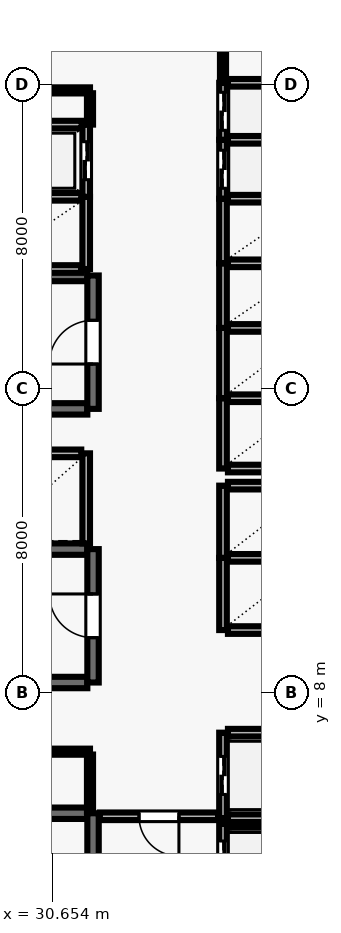
"""IFC4 building model, lengths in metres.
Left out: names, types, materials, properties, quantities, classifications, styles, units other than length and angle.
Written with IfcOpenShell. Run it as: python <this file> out.ifc"""

import sys

from ifc_helpers import new_model, si_unit, direction, frame, frame_2d, origin, place, context, subcontext, project, spatial, rectangle, extrude, element, fill, save


model = new_model("IFC4")
c1 = context("Model", 3, precision=1e-05, world=origin(), true_north=direction((0.0, 1.0)))
c2 = subcontext(c1, "Body", "Model", "MODEL_VIEW")
j1 = project(units=[si_unit("LENGTHUNIT", "METRE"), si_unit("PLANEANGLEUNIT", "RADIAN")], contexts=[c1])
p1 = place(None, origin())
s1 = spatial("IfcSite", under=j1, at=p1, CompositionType="ELEMENT")
p2 = place(p1, origin())
s2 = spatial("IfcBuilding", under=s1, at=p2, CompositionType="ELEMENT")
p3 = place(p2, frame((0.0, 0.0, 34.9)))
s3 = spatial("IfcBuildingStorey", under=s2, at=p3, CompositionType="ELEMENT", Elevation=34.9)
p4 = place(p3, frame((31.58, 4.83, 0.0), z_axis=(0.0, 0.0, 1.0), x_axis=(-1.0, 0.0, 0.0)))
e1 = element("IfcWall", 1, at=p4, inside=s3, PredefinedType="SHEAR", context=c2, shape_type="SweptSolid", body=[
    extrude(rectangle(XDim=8.36, YDim=0.3, at=frame_2d((4.18, 0.0))), origin(), (0.0, 0.0, 1.0), 3.69),
])
p5 = place(p3, frame((31.73, 0.96, 0.0), z_axis=(0.0, 0.0, 1.0), x_axis=(0.0, 1.0, 0.0)))
e2 = element("IfcWall", 2, at=p5, inside=s3, PredefinedType="SHEAR", context=c2, shape_type="SweptSolid", body=[
    extrude(rectangle(XDim=3.87, YDim=0.3, at=frame_2d((1.935, 0.0))), origin(), (0.0, 0.0, 1.0), 3.69),
])
p6 = place(p5, frame((1.54, 0.0, 0.0)))
e3 = element("IfcOpeningElement", 3, at=p6, cuts=e2, PredefinedType="OPENING", context=c2, shape_type="SweptSolid", body=[
    extrude(rectangle(XDim=1.15, YDim=2.15, at=frame_2d((0.575, 1.075))), frame((0.0, 0.16, 0.0), z_axis=(0.0, -1.0, 0.0), x_axis=(1.0, 0.0, 0.0)), (0.0, 0.0, 1.0), 0.32),
])
for number, where, z_axis, x_axis in (
    (4, (31.58, 18.98, 0.0), (0.0, 0.0, 1.0), (-1.0, 0.0, 0.0)),
    (5, (23.22, 15.47, 0.0), (0.0, 0.0, 1.0), (1.0, 0.0, 0.0)),
):
    element("IfcWall", number, at=place(p3, frame(where, z_axis=z_axis, x_axis=x_axis)), inside=s3, PredefinedType="SHEAR", context=c2, shape_type="SweptSolid", body=[
        extrude(rectangle(XDim=8.36, YDim=0.3, at=frame_2d((4.18, 0.0))), origin(), (0.0, 0.0, 1.0), 3.69),
    ])
p7 = place(p3, frame((31.73, 15.47, 0.0), z_axis=(0.0, 0.0, 1.0), x_axis=(0.0, 1.0, 0.0)))
e6 = element("IfcWall", 6, at=p7, inside=s3, PredefinedType="SHEAR", context=c2, shape_type="SweptSolid", body=[
    extrude(rectangle(XDim=3.51, YDim=0.3, at=frame_2d((1.755, 0.0))), origin(), (0.0, 0.0, 1.0), 3.69),
])
p8 = place(p7, frame((1.18, 0.0, 0.0)))
e7 = element("IfcOpeningElement", 7, at=p8, cuts=e6, PredefinedType="OPENING", context=c2, shape_type="SweptSolid", body=[
    extrude(rectangle(XDim=1.15, YDim=2.15, at=frame_2d((0.575, 1.075))), frame((0.0, 0.16, 0.0), z_axis=(0.0, -1.0, 0.0), x_axis=(1.0, 0.0, 0.0)), (0.0, 0.0, 1.0), 0.32),
])
for number, where, z_axis, x_axis in (
    (8, (31.58, 11.78, 0.0), (0.0, 0.0, 1.0), (-1.0, 0.0, 0.0)),
    (9, (23.22, 8.27, 0.0), (0.0, 0.0, 1.0), (1.0, 0.0, 0.0)),
):
    element("IfcWall", number, at=place(p3, frame(where, z_axis=z_axis, x_axis=x_axis)), inside=s3, PredefinedType="SHEAR", context=c2, shape_type="SweptSolid", body=[
        extrude(rectangle(XDim=8.36, YDim=0.3, at=frame_2d((4.18, 0.0))), origin(), (0.0, 0.0, 1.0), 3.69),
    ])
p9 = place(p3, frame((31.73, 8.27, 0.0), z_axis=(0.0, 0.0, 1.0), x_axis=(0.0, 1.0, 0.0)))
e10 = element("IfcWall", 10, at=p9, inside=s3, PredefinedType="SHEAR", context=c2, shape_type="SweptSolid", body=[
    extrude(rectangle(XDim=3.51, YDim=0.3, at=frame_2d((1.755, 0.0))), origin(), (0.0, 0.0, 1.0), 3.69),
])
p10 = place(p9, frame((1.18, 0.0, 0.0)))
e11 = element("IfcOpeningElement", 11, at=p10, cuts=e10, PredefinedType="OPENING", context=c2, shape_type="SweptSolid", body=[
    extrude(rectangle(XDim=1.15, YDim=2.15, at=frame_2d((0.575, 1.075))), frame((0.0, 0.16, 0.0), z_axis=(0.0, -1.0, 0.0), x_axis=(1.0, 0.0, 0.0)), (0.0, 0.0, 1.0), 0.32),
])
p11 = place(p3, frame((35.15, 4.55, 0.0), z_axis=(0.0, 0.0, 1.0), x_axis=(0.0, -1.0, 0.0)))
e12 = element("IfcWall", 12, at=p11, inside=s3, PredefinedType="SOLIDWALL", context=c2, shape_type="SweptSolid", body=[
    extrude(rectangle(XDim=2.1, YDim=0.2, at=frame_2d((1.05, 0.0))), origin(), (0.0, 0.0, 1.0), 3.69),
])
p12 = place(p11, frame((0.45, 0.0, 0.0)))
e13 = element("IfcOpeningElement", 13, at=p12, cuts=e12, PredefinedType="OPENING", context=c2, shape_type="SweptSolid", body=[
    extrude(rectangle(XDim=1.2, YDim=2.15, at=frame_2d((0.6, 1.075))), frame((0.0, 0.11, 0.0), z_axis=(0.0, -1.0, 0.0), x_axis=(1.0, 0.0, 0.0)), (0.0, 0.0, 1.0), 0.22),
])
p13 = place(p3, frame((37.42, 4.55, 0.0), z_axis=(0.0, 0.0, 1.0), x_axis=(-1.0, 0.0, 0.0)))
e14 = element("IfcWall", 14, at=p13, inside=s3, PredefinedType="SOLIDWALL", context=c2, shape_type="SweptSolid", body=[
    extrude(rectangle(XDim=2.14, YDim=0.2, at=frame_2d((1.07, 0.0))), origin(), (0.0, 0.0, 1.0), 3.69),
])
p14 = place(p3, frame((35.15, 6.95, 0.0), z_axis=(0.0, 0.0, 1.0), x_axis=(0.0, -1.0, 0.0)))
e15 = element("IfcWall", 15, at=p14, inside=s3, PredefinedType="SOLIDWALL", context=c2, shape_type="SweptSolid", body=[
    extrude(rectangle(XDim=2.25, YDim=0.2, at=frame_2d((1.125, 0.0))), origin(), (0.0, 0.0, 1.0), 3.69),
])
p15 = place(p14, frame((0.625, 0.0, 0.0)))
e16 = element("IfcOpeningElement", 16, at=p15, cuts=e15, PredefinedType="OPENING", context=c2, shape_type="SweptSolid", body=[
    extrude(rectangle(XDim=1.0, YDim=2.1, at=frame_2d((0.5, 1.05))), frame((0.0, 0.11, 0.0), z_axis=(0.0, -1.0, 0.0), x_axis=(1.0, 0.0, 0.0)), (0.0, 0.0, 1.0), 0.22),
])
for number, where, z_axis, x_axis in (
    (17, (35.28, 4.7, 0.0), (0.0, 0.0, 1.0), (1.0, 0.0, 0.0)),
    (18, (37.42, 6.95, 0.0), (0.0, 0.0, 1.0), (-1.0, 0.0, 0.0)),
):
    element("IfcWall", number, at=place(p3, frame(where, z_axis=z_axis, x_axis=x_axis)), inside=s3, PredefinedType="SOLIDWALL", context=c2, shape_type="SweptSolid", body=[
        extrude(rectangle(XDim=2.14, YDim=0.2, at=frame_2d((1.07, 0.0))), origin(), (0.0, 0.0, 1.0), 3.69),
    ])
p16 = place(p3, frame((35.15, 11.55, 0.0), z_axis=(0.0, 0.0, 1.0), x_axis=(0.0, -1.0, 0.0)))
e19 = element("IfcWall", 19, at=p16, inside=s3, PredefinedType="SOLIDWALL", context=c2, shape_type="SweptSolid", body=[
    extrude(rectangle(XDim=1.9, YDim=0.2, at=frame_2d((0.95, 0.0))), origin(), (0.0, 0.0, 1.0), 3.69),
])
for number, where, z_axis, x_axis in (
    (20, (35.28, 9.65, 0.0), (0.0, 0.0, 1.0), (1.0, 0.0, 0.0)),
    (21, (37.42, 11.55, 0.0), (0.0, 0.0, 1.0), (-1.0, 0.0, 0.0)),
):
    element("IfcWall", number, at=place(p3, frame(where, z_axis=z_axis, x_axis=x_axis)), inside=s3, PredefinedType="SOLIDWALL", context=c2, shape_type="SweptSolid", body=[
        extrude(rectangle(XDim=2.14, YDim=0.2, at=frame_2d((1.07, 0.0))), origin(), (0.0, 0.0, 1.0), 3.69),
    ])
p17 = place(p3, frame((35.15, 13.45, 0.0), z_axis=(0.0, 0.0, 1.0), x_axis=(0.0, -1.0, 0.0)))
e22 = element("IfcWall", 22, at=p17, inside=s3, PredefinedType="SOLIDWALL", context=c2, shape_type="SweptSolid", body=[
    extrude(rectangle(XDim=1.9, YDim=0.2, at=frame_2d((0.95, 0.0))), origin(), (0.0, 0.0, 1.0), 3.69),
])
p18 = place(p3, frame((37.42, 13.45, 0.0), z_axis=(0.0, 0.0, 1.0), x_axis=(-1.0, 0.0, 0.0)))
e23 = element("IfcWall", 23, at=p18, inside=s3, PredefinedType="SOLIDWALL", context=c2, shape_type="SweptSolid", body=[
    extrude(rectangle(XDim=2.14, YDim=0.2, at=frame_2d((1.07, 0.0))), origin(), (0.0, 0.0, 1.0), 3.69),
])
p19 = place(p3, frame((31.55, 11.93, 0.0), z_axis=(0.0, 0.0, 1.0), x_axis=(0.0, 1.0, 0.0)))
e24 = element("IfcWall", 24, at=p19, inside=s3, PredefinedType="SOLIDWALL", context=c2, shape_type="SweptSolid", body=[
    extrude(rectangle(XDim=2.37, YDim=0.2, at=frame_2d((1.185, 0.0))), origin(), (0.0, 0.0, 1.0), 3.69),
])
p20 = place(p3, frame((31.42, 14.3, 0.0), z_axis=(0.0, 0.0, 1.0), x_axis=(-1.0, 0.0, 0.0)))
e25 = element("IfcWall", 25, at=p20, inside=s3, PredefinedType="SOLIDWALL", context=c2, shape_type="SweptSolid", body=[
    extrude(rectangle(XDim=2.44, YDim=0.2, at=frame_2d((1.22, 0.0))), origin(), (0.0, 0.0, 1.0), 3.69),
])
p21 = place(p3, frame((35.15, 15.75, 0.0), z_axis=(0.0, 0.0, 1.0), x_axis=(0.0, -1.0, 0.0)))
e26 = element("IfcWall", 26, at=p21, inside=s3, PredefinedType="SOLIDWALL", context=c2, shape_type="SweptSolid", body=[
    extrude(rectangle(XDim=1.85, YDim=0.2, at=frame_2d((0.925, 0.0))), origin(), (0.0, 0.0, 1.0), 3.69),
])
for number, where, z_axis, x_axis in (
    (27, (35.28, 13.9, 0.0), (0.0, 0.0, 1.0), (1.0, 0.0, 0.0)),
    (28, (37.42, 15.75, 0.0), (0.0, 0.0, 1.0), (-1.0, 0.0, 0.0)),
):
    element("IfcWall", number, at=place(p3, frame(where, z_axis=z_axis, x_axis=x_axis)), inside=s3, PredefinedType="SOLIDWALL", context=c2, shape_type="SweptSolid", body=[
        extrude(rectangle(XDim=2.14, YDim=0.2, at=frame_2d((1.07, 0.0))), origin(), (0.0, 0.0, 1.0), 3.69),
    ])
p22 = place(p3, frame((35.15, 17.6, 0.0), z_axis=(0.0, 0.0, 1.0), x_axis=(0.0, -1.0, 0.0)))
e29 = element("IfcWall", 29, at=p22, inside=s3, PredefinedType="SOLIDWALL", context=c2, shape_type="SweptSolid", body=[
    extrude(rectangle(XDim=1.85, YDim=0.2, at=frame_2d((0.925, 0.0))), origin(), (0.0, 0.0, 1.0), 3.69),
])
p23 = place(p3, frame((37.42, 17.6, 0.0), z_axis=(0.0, 0.0, 1.0), x_axis=(-1.0, 0.0, 0.0)))
e30 = element("IfcWall", 30, at=p23, inside=s3, PredefinedType="SOLIDWALL", context=c2, shape_type="SweptSolid", body=[
    extrude(rectangle(XDim=2.14, YDim=0.2, at=frame_2d((1.07, 0.0))), origin(), (0.0, 0.0, 1.0), 3.69),
])
p24 = place(p3, frame((35.15, 19.3, 0.0), z_axis=(0.0, 0.0, 1.0), x_axis=(0.0, -1.0, 0.0)))
e31 = element("IfcWall", 31, at=p24, inside=s3, PredefinedType="SOLIDWALL", context=c2, shape_type="SweptSolid", body=[
    extrude(rectangle(XDim=1.7, YDim=0.2, at=frame_2d((0.85, 0.0))), origin(), (0.0, 0.0, 1.0), 3.69),
])
p25 = place(p3, frame((37.42, 19.3, 0.0), z_axis=(0.0, 0.0, 1.0), x_axis=(-1.0, 0.0, 0.0)))
e32 = element("IfcWall", 32, at=p25, inside=s3, PredefinedType="SOLIDWALL", context=c2, shape_type="SweptSolid", body=[
    extrude(rectangle(XDim=2.14, YDim=0.2, at=frame_2d((1.07, 0.0))), origin(), (0.0, 0.0, 1.0), 3.69),
])
p26 = place(p3, frame((35.15, 21.0, 0.0), z_axis=(0.0, 0.0, 1.0), x_axis=(0.0, -1.0, 0.0)))
e33 = element("IfcWall", 33, at=p26, inside=s3, PredefinedType="SOLIDWALL", context=c2, shape_type="SweptSolid", body=[
    extrude(rectangle(XDim=1.7, YDim=0.2, at=frame_2d((0.85, 0.0))), origin(), (0.0, 0.0, 1.0), 3.69),
])
p27 = place(p3, frame((37.42, 21.0, 0.0), z_axis=(0.0, 0.0, 1.0), x_axis=(-1.0, 0.0, 0.0)))
e34 = element("IfcWall", 34, at=p27, inside=s3, PredefinedType="SOLIDWALL", context=c2, shape_type="SweptSolid", body=[
    extrude(rectangle(XDim=2.14, YDim=0.2, at=frame_2d((1.07, 0.0))), origin(), (0.0, 0.0, 1.0), 3.69),
])
p28 = place(p3, frame((31.55, 19.15, 0.0), z_axis=(0.0, 0.0, 1.0), x_axis=(0.0, 1.0, 0.0)))
e35 = element("IfcWall", 35, at=p28, inside=s3, PredefinedType="SOLIDWALL", context=c2, shape_type="SweptSolid", body=[
    extrude(rectangle(XDim=1.9, YDim=0.2, at=frame_2d((0.95, 0.0))), origin(), (0.0, 0.0, 1.0), 3.69),
])
for number, where, z_axis, x_axis in (
    (36, (28.98, 19.15, 0.0), (0.0, 0.0, 1.0), (1.0, 0.0, 0.0)),
    (37, (31.42, 21.05, 0.0), (0.0, 0.0, 1.0), (-1.0, 0.0, 0.0)),
):
    element("IfcWall", number, at=place(p3, frame(where, z_axis=z_axis, x_axis=x_axis)), inside=s3, PredefinedType="SOLIDWALL", context=c2, shape_type="SweptSolid", body=[
        extrude(rectangle(XDim=2.44, YDim=0.2, at=frame_2d((1.22, 0.0))), origin(), (0.0, 0.0, 1.0), 3.69),
    ])
p29 = place(p3, frame((35.15, 22.55, 0.0), z_axis=(0.0, 0.0, 1.0), x_axis=(0.0, -1.0, 0.0)))
e38 = element("IfcWall", 38, at=p29, inside=s3, PredefinedType="SOLIDWALL", context=c2, shape_type="SweptSolid", body=[
    extrude(rectangle(XDim=1.55, YDim=0.2, at=frame_2d((0.775, 0.0))), origin(), (0.0, 0.0, 1.0), 3.69),
])
p30 = place(p29, frame((0.275, 0.0, 0.0)))
e39 = element("IfcOpeningElement", 39, at=p30, cuts=e38, PredefinedType="OPENING", context=c2, shape_type="SweptSolid", body=[
    extrude(rectangle(XDim=1.0, YDim=2.1, at=frame_2d((0.5, 1.05))), frame((0.0, 0.11, 0.0), z_axis=(0.0, -1.0, 0.0), x_axis=(1.0, 0.0, 0.0)), (0.0, 0.0, 1.0), 0.22),
])
p31 = place(p3, frame((37.42, 22.55, 0.0), z_axis=(0.0, 0.0, 1.0), x_axis=(-1.0, 0.0, 0.0)))
e40 = element("IfcWall", 40, at=p31, inside=s3, PredefinedType="SOLIDWALL", context=c2, shape_type="SweptSolid", body=[
    extrude(rectangle(XDim=2.14, YDim=0.2, at=frame_2d((1.07, 0.0))), origin(), (0.0, 0.0, 1.0), 3.69),
])
p32 = place(p3, frame((35.15, 24.05, 0.0), z_axis=(0.0, 0.0, 1.0), x_axis=(0.0, -1.0, 0.0)))
e41 = element("IfcWall", 41, at=p32, inside=s3, PredefinedType="SOLIDWALL", context=c2, shape_type="SweptSolid", body=[
    extrude(rectangle(XDim=1.5, YDim=0.2, at=frame_2d((0.75, 0.0))), origin(), (0.0, 0.0, 1.0), 3.69),
])
p33 = place(p32, frame((0.25, 0.0, 0.0)))
e42 = element("IfcOpeningElement", 42, at=p33, cuts=e41, PredefinedType="OPENING", context=c2, shape_type="SweptSolid", body=[
    extrude(rectangle(XDim=1.0, YDim=2.1, at=frame_2d((0.5, 1.05))), frame((0.0, 0.11, 0.0), z_axis=(0.0, -1.0, 0.0), x_axis=(1.0, 0.0, 0.0)), (0.0, 0.0, 1.0), 0.22),
])
p34 = place(p3, frame((37.42, 24.05, 0.0), z_axis=(0.0, 0.0, 1.0), x_axis=(-1.0, 0.0, 0.0)))
e43 = element("IfcWall", 43, at=p34, inside=s3, PredefinedType="SOLIDWALL", context=c2, shape_type="SweptSolid", body=[
    extrude(rectangle(XDim=2.14, YDim=0.2, at=frame_2d((1.07, 0.0))), origin(), (0.0, 0.0, 1.0), 3.69),
])
p35 = place(p3, frame((31.55, 21.05, 0.0), z_axis=(0.0, 0.0, 1.0), x_axis=(0.0, 1.0, 0.0)))
e44 = element("IfcWall", 44, at=p35, inside=s3, PredefinedType="SOLIDWALL", context=c2, shape_type="SweptSolid", body=[
    extrude(rectangle(XDim=1.9, YDim=0.2, at=frame_2d((0.95, 0.0))), origin(), (0.0, 0.0, 1.0), 3.69),
])
p36 = place(p35, frame((0.45, 0.0, 0.0)))
e45 = element("IfcOpeningElement", 45, at=p36, cuts=e44, PredefinedType="OPENING", context=c2, shape_type="SweptSolid", body=[
    extrude(rectangle(XDim=1.0, YDim=2.1, at=frame_2d((0.5, 1.05))), frame((0.0, 0.11, 0.0), z_axis=(0.0, -1.0, 0.0), x_axis=(1.0, 0.0, 0.0)), (0.0, 0.0, 1.0), 0.22),
])
p37 = place(p3, frame((31.43, 22.95, 0.0), z_axis=(0.0, 0.0, 1.0), x_axis=(-1.0, 0.0, 0.0)))
e46 = element("IfcWall", 46, at=p37, inside=s3, PredefinedType="SOLIDWALL", context=c2, shape_type="SweptSolid", body=[
    extrude(rectangle(XDim=2.46, YDim=0.2, at=frame_2d((1.23, 0.0))), origin(), (0.0, 0.0, 1.0), 3.69),
])
p38 = place(p3, frame((28.55, 6.45, 0.0), z_axis=(0.0, 0.0, 1.0), x_axis=(1.0, 0.0, 0.0)))
e47 = element("IfcWall", 47, at=p38, inside=s3, PredefinedType="PARTITIONING", context=c2, shape_type="SweptSolid", body=[
    extrude(rectangle(XDim=3.1, YDim=0.16, at=frame_2d((1.55, 0.0))), origin(), (0.0, 0.0, 1.0), 3.69),
])
p39 = place(p38, frame((1.11, 0.0, 0.0)))
e48 = element("IfcOpeningElement", 48, at=p39, cuts=e47, PredefinedType="OPENING", context=c2, shape_type="SweptSolid", body=[
    extrude(rectangle(XDim=0.88, YDim=2.1, at=frame_2d((0.44, 1.05))), frame((0.0, 0.09, 0.0), z_axis=(0.0, -1.0, 0.0), x_axis=(1.0, 0.0, 0.0)), (0.0, 0.0, 1.0), 0.18),
])
p40 = place(p3, frame((28.8, 23.85, 0.0), z_axis=(0.0, 0.0, 1.0), x_axis=(1.0, 0.0, 0.0)))
e49 = element("IfcWall", 49, at=p40, inside=s3, PredefinedType="PARTITIONING", context=c2, shape_type="SweptSolid", body=[
    extrude(rectangle(XDim=2.85, YDim=0.16, at=frame_2d((1.425, 0.0))), origin(), (0.0, 0.0, 1.0), 3.69),
])
p41 = place(p3, frame((35.02, 4.75, 0.0), z_axis=(0.0, 0.0, 1.0), x_axis=(-1.0, 0.0, 0.0)))
e50 = element("IfcWall", 50, at=p41, inside=s3, PredefinedType="SOLIDWALL", context=c2, shape_type="SweptSolid", body=[
    extrude(rectangle(XDim=3.11, YDim=0.2, at=frame_2d((1.555, 0.0))), origin(), (0.0, 0.0, 1.0), 3.69),
])
p42 = place(p41, frame((1.03, 0.0, 0.0)))
e51 = element("IfcOpeningElement", 51, at=p42, cuts=e50, PredefinedType="OPENING", context=c2, shape_type="SweptSolid", body=[
    extrude(rectangle(XDim=1.05, YDim=2.15, at=frame_2d((0.525, 1.075))), frame((0.0, 0.11, 0.0), z_axis=(0.0, -1.0, 0.0), x_axis=(1.0, 0.0, 0.0)), (0.0, 0.0, 1.0), 0.22),
])
p43 = place(p3, frame((31.65, 4.86, 0.0), z_axis=(0.0, 0.0, 1.0), x_axis=(0.0, 1.0, 0.0)))
e52 = element("IfcWall", 52, at=p43, inside=s3, PredefinedType="PARTITIONING", context=c2, shape_type="SweptSolid", body=[
    extrude(rectangle(XDim=1.515, YDim=0.16, at=frame_2d((0.757, 0.0))), origin(), (0.0, 0.0, 1.0), 3.69),
])
p44 = place(p3, frame((31.65, 23.775, 0.0), z_axis=(0.0, 0.0, 1.0), x_axis=(0.0, -1.0, 0.0)))
e53 = element("IfcWall", 53, at=p44, inside=s3, PredefinedType="PARTITIONING", context=c2, shape_type="SweptSolid", body=[
    extrude(rectangle(XDim=0.825, YDim=0.16, at=frame_2d((0.413, 0.0))), origin(), (0.0, 0.0, 1.0), 3.69),
])
p45 = place(p3, frame((35.15, 24.07, 0.0), z_axis=(0.0, 0.0, 1.0), x_axis=(0.0, 1.0, 0.0)))
e54 = element("IfcWall", 54, at=p45, inside=s3, PredefinedType="PARTITIONING", context=c2, shape_type="SweptSolid", body=[
    extrude(rectangle(XDim=1.855, YDim=0.16, at=frame_2d((0.927, 0.0))), origin(), (0.0, 0.0, 1.0), 3.69),
])
p46 = place(p8, origin())
e55 = element("IfcDoor", 55, at=p46, inside=s3, OperationType="SINGLE_SWING_LEFT", PredefinedType="DOOR", context=c2, shape_type="SweptSolid", body=[
    extrude(rectangle(XDim=1.15, YDim=2.15, at=frame_2d((0.575, 1.075))), frame((0.0, 0.025, 0.0), z_axis=(0.0, -1.0, 0.0), x_axis=(1.0, 0.0, 0.0)), (0.0, 0.0, 1.0), 0.05),
])
fill(e7, e55)
p47 = place(p10, origin())
e56 = element("IfcDoor", 56, at=p47, inside=s3, OperationType="SINGLE_SWING_RIGHT", PredefinedType="DOOR", context=c2, shape_type="SweptSolid", body=[
    extrude(rectangle(XDim=1.15, YDim=2.15, at=frame_2d((0.575, 1.075))), frame((0.0, 0.025, 0.0), z_axis=(0.0, -1.0, 0.0), x_axis=(1.0, 0.0, 0.0)), (0.0, 0.0, 1.0), 0.05),
])
fill(e11, e56)
p48 = place(p12, origin())
e57 = element("IfcDoor", 57, at=p48, inside=s3, OperationType="DOUBLE_DOOR_SLIDING", PredefinedType="DOOR", context=c2, shape_type="SweptSolid", body=[
    extrude(rectangle(XDim=1.2, YDim=2.15, at=frame_2d((0.6, 1.075))), frame((0.0, 0.025, 0.0), z_axis=(0.0, -1.0, 0.0), x_axis=(1.0, 0.0, 0.0)), (0.0, 0.0, 1.0), 0.05),
])
fill(e13, e57)
p49 = place(p15, origin())
e58 = element("IfcDoor", 58, at=p49, inside=s3, OperationType="DOUBLE_DOOR_SLIDING", PredefinedType="DOOR", context=c2, shape_type="SweptSolid", body=[
    extrude(rectangle(XDim=1.0, YDim=2.1, at=frame_2d((0.5, 1.05))), frame((0.0, 0.025, 0.0), z_axis=(0.0, -1.0, 0.0), x_axis=(1.0, 0.0, 0.0)), (0.0, 0.0, 1.0), 0.05),
])
fill(e16, e58)
p50 = place(p30, origin())
e59 = element("IfcDoor", 59, at=p50, inside=s3, OperationType="DOUBLE_DOOR_SLIDING", PredefinedType="DOOR", context=c2, shape_type="SweptSolid", body=[
    extrude(rectangle(XDim=1.0, YDim=2.1, at=frame_2d((0.5, 1.05))), frame((0.0, 0.025, 0.0), z_axis=(0.0, -1.0, 0.0), x_axis=(1.0, 0.0, 0.0)), (0.0, 0.0, 1.0), 0.05),
])
fill(e39, e59)
p51 = place(p33, origin())
e60 = element("IfcDoor", 60, at=p51, inside=s3, OperationType="DOUBLE_DOOR_SLIDING", PredefinedType="DOOR", context=c2, shape_type="SweptSolid", body=[
    extrude(rectangle(XDim=1.0, YDim=2.1, at=frame_2d((0.5, 1.05))), frame((0.0, 0.025, 0.0), z_axis=(0.0, -1.0, 0.0), x_axis=(1.0, 0.0, 0.0)), (0.0, 0.0, 1.0), 0.05),
])
fill(e42, e60)
p52 = place(p36, origin())
e61 = element("IfcDoor", 61, at=p52, inside=s3, OperationType="DOUBLE_DOOR_SLIDING", PredefinedType="DOOR", context=c2, shape_type="SweptSolid", body=[
    extrude(rectangle(XDim=1.0, YDim=2.1, at=frame_2d((0.5, 1.05))), frame((0.0, 0.025, 0.0), z_axis=(0.0, -1.0, 0.0), x_axis=(1.0, 0.0, 0.0)), (0.0, 0.0, 1.0), 0.05),
])
fill(e45, e61)
p53 = place(p42, origin())
e62 = element("IfcDoor", 62, at=p53, inside=s3, OperationType="SINGLE_SWING_LEFT", PredefinedType="DOOR", context=c2, shape_type="SweptSolid", body=[
    extrude(rectangle(XDim=1.05, YDim=2.15, at=frame_2d((0.525, 1.075))), frame((0.0, 0.025, 0.0), z_axis=(0.0, -1.0, 0.0), x_axis=(1.0, 0.0, 0.0)), (0.0, 0.0, 1.0), 0.05),
])
fill(e51, e62)
save(model, sys.argv[1])
